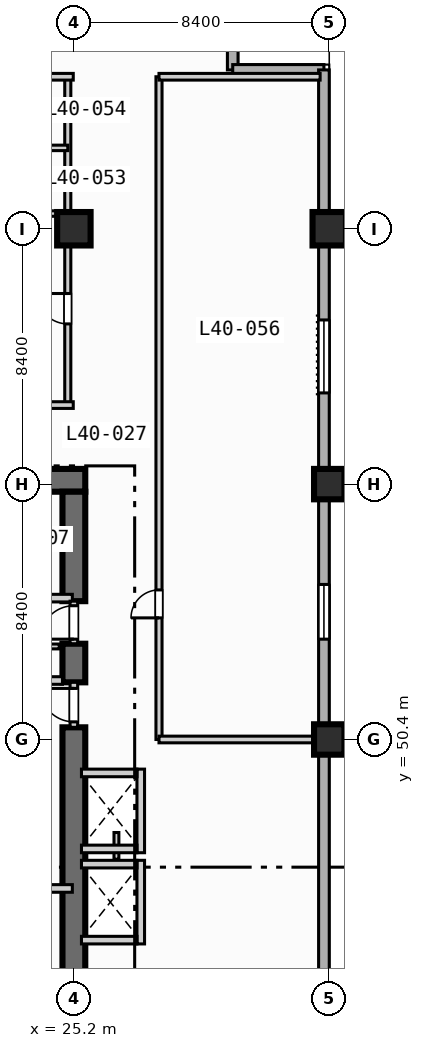
"""IFC4 building model, lengths in metres.
Left out: names, types, materials, properties, quantities, classifications, styles, units other than length and angle.
Written with IfcOpenShell. Run it as: python <this file> out.ifc"""

import sys

from ifc_helpers import new_model, si_unit, direction, frame, frame_2d, origin, origin_2d, place, context, subcontext, project, spatial, rectangle, extrude, element, fill, save


model = new_model("IFC4")
c1 = context("Model", 3, precision=1e-05, world=origin(), true_north=direction((0.0, 1.0)))
c2 = subcontext(c1, "Body", "Model", "MODEL_VIEW")
j1 = project(units=[si_unit("LENGTHUNIT", "METRE"), si_unit("PLANEANGLEUNIT", "RADIAN")], contexts=[c1])
p1 = place(None, origin())
s1 = spatial("IfcSite", under=j1, at=p1, CompositionType="ELEMENT")
p2 = place(p1, origin())
s2 = spatial("IfcBuilding", under=s1, at=p2, CompositionType="ELEMENT")
p3 = place(p2, frame((0.0, 0.0, 168.0)))
s3 = spatial("IfcBuildingStorey", under=s2, at=p3, CompositionType="ELEMENT", Elevation=168.0)
p4 = place(p3, frame((20.5, 58.925, 0.0), z_axis=(0.0, 0.0, 1.0), x_axis=(1.0, 0.0, 0.0)))
e1 = element("IfcWall", 1, at=p4, inside=s3, PredefinedType="SHEAR", context=c2, shape_type="SweptSolid", body=[
    extrude(rectangle(XDim=5.075, YDim=0.75, at=frame_2d((2.538, 0.0))), origin(), (0.0, 0.0, 1.0), 3.47),
])
p5 = place(p3, frame((25.2, 42.2, 0.0), z_axis=(0.0, 0.0, 1.0), x_axis=(0.0, 1.0, 0.0)))
e2 = element("IfcWall", 2, at=p5, inside=s3, PredefinedType="SHEAR", context=c2, shape_type="SweptSolid", body=[
    extrude(rectangle(XDim=8.6, YDim=0.75, at=frame_2d((4.3, 0.0))), origin(), (0.0, 0.0, 1.0), 3.47),
])
p6 = place(p3, frame((25.2, 52.28, 0.0), z_axis=(0.0, 0.0, 1.0), x_axis=(0.0, 1.0, 0.0)))
e3 = element("IfcWall", 3, at=p6, inside=s3, PredefinedType="SHEAR", context=c2, shape_type="SweptSolid", body=[
    extrude(rectangle(XDim=1.27, YDim=0.75, at=frame_2d((0.635, 0.0))), origin(), (0.0, 0.0, 1.0), 3.47),
])
p7 = place(p3, frame((25.2, 54.95, 0.0), z_axis=(0.0, 0.0, 1.0), x_axis=(0.0, 1.0, 0.0)))
e4 = element("IfcWall", 4, at=p7, inside=s3, PredefinedType="SHEAR", context=c2, shape_type="SweptSolid", body=[
    extrude(rectangle(XDim=3.6, YDim=0.75, at=frame_2d((1.8, 0.0))), origin(), (0.0, 0.0, 1.0), 3.47),
])
p8 = place(p3, frame((25.2, 67.2, 0.0), z_axis=(0.0, 0.0, 1.0), x_axis=(1.0, 0.0, 0.0)))
e5 = element("IfcColumn", 5, at=p8, inside=s3, PredefinedType="COLUMN", context=c2, shape_type="SweptSolid", body=[
    extrude(rectangle(XDim=1.1, YDim=1.1, at=origin_2d()), origin(), (0.0, 0.0, 1.0), 3.7),
])
for number, where, z_axis, x_axis in (
    (6, (33.6, 50.4, 0.0), (0.0, 0.0, 1.0), (1.0, 0.0, 0.0)),
    (7, (33.6, 58.8, 0.0), (0.0, 0.0, 1.0), (1.0, 0.0, 0.0)),
):
    element("IfcColumn", number, at=place(p3, frame(where, z_axis=z_axis, x_axis=x_axis)), inside=s3, PredefinedType="COLUMN", context=c2, shape_type="SweptSolid", body=[
        extrude(rectangle(XDim=1.0, YDim=1.0, at=origin_2d()), origin(), (0.0, 0.0, 1.0), 3.7),
    ])
p9 = place(p3, frame((33.6, 67.2, 0.0), z_axis=(0.0, 0.0, 1.0), x_axis=(1.0, 0.0, 0.0)))
e8 = element("IfcColumn", 8, at=p9, inside=s3, PredefinedType="COLUMN", context=c2, shape_type="SweptSolid", body=[
    extrude(rectangle(XDim=1.1, YDim=1.1, at=origin_2d()), origin(), (0.0, 0.0, 1.0), 3.7),
])
for number, where, z_axis, x_axis in (
    (9, (30.425, 75.425, 0.0), (0.0, 0.0, 1.0), (0.0, -1.0, 0.0)),
    (10, (30.425, 72.425, 0.0), (0.0, 0.0, 1.0), (1.0, 0.0, 0.0)),
):
    element("IfcWall", number, at=place(p3, frame(where, z_axis=z_axis, x_axis=x_axis)), inside=s3, PredefinedType="STANDARD", context=c2, shape_type="SweptSolid", body=[
        extrude(rectangle(XDim=3.0, YDim=0.35, at=frame_2d((1.5, 0.0))), origin(), (0.0, 0.0, 1.0), 3.47),
    ])
p10 = place(p3, frame((33.425, 72.425, 0.0), z_axis=(0.0, 0.0, 1.0), x_axis=(0.0, -1.0, 0.0)))
e11 = element("IfcWall", 11, at=p10, inside=s3, PredefinedType="STANDARD", context=c2, shape_type="SweptSolid", body=[
    extrude(rectangle(XDim=39.0, YDim=0.35, at=frame_2d((19.5, 0.0))), origin(), (0.0, 0.0, 1.0), 3.47),
])
p11 = place(p10, frame((33.725, 0.0, 0.85)))
e12 = element("IfcOpeningElement", 12, at=p11, cuts=e11, PredefinedType="OPENING", context=c2, shape_type="SweptSolid", body=[
    extrude(rectangle(XDim=1.8, YDim=1.8, at=frame_2d((0.9, 0.9))), frame((0.0, 0.185, 0.0), z_axis=(0.0, -1.0, 0.0), x_axis=(1.0, 0.0, 0.0)), (0.0, 0.0, 1.0), 0.37),
])
p12 = place(p10, frame((16.925, 0.0, 0.85)))
e13 = element("IfcOpeningElement", 13, at=p12, cuts=e11, PredefinedType="OPENING", context=c2, shape_type="SweptSolid", body=[
    extrude(rectangle(XDim=1.8, YDim=1.8, at=frame_2d((0.9, 0.9))), frame((0.0, 0.185, 0.0), z_axis=(0.0, -1.0, 0.0), x_axis=(1.0, 0.0, 0.0)), (0.0, 0.0, 1.0), 0.37),
])
p13 = place(p10, frame((8.225, 0.0, 0.85)))
e14 = element("IfcOpeningElement", 14, at=p13, cuts=e11, PredefinedType="OPENING", context=c2, shape_type="SweptSolid", body=[
    extrude(rectangle(XDim=2.4, YDim=1.95, at=frame_2d((1.2, 0.975))), frame((0.0, 0.185, 0.0), z_axis=(0.0, -1.0, 0.0), x_axis=(1.0, 0.0, 0.0)), (0.0, 0.0, 1.0), 0.37),
])
p14 = place(p3, frame((21.0, 45.5, 0.0), z_axis=(0.0, 0.0, 1.0), x_axis=(1.0, 0.0, 0.0)))
e15 = element("IfcWall", 15, at=p14, inside=s3, PredefinedType="SOLIDWALL", context=c2, shape_type="SweptSolid", body=[
    extrude(rectangle(XDim=4.15, YDim=0.25, at=frame_2d((2.075, 0.0))), origin(), (0.0, 0.0, 1.0), 3.47),
])
p15 = place(p14, frame((0.65, 0.0, 0.0)))
e16 = element("IfcOpeningElement", 16, at=p15, cuts=e15, PredefinedType="OPENING", context=c2, shape_type="SweptSolid", body=[
    extrude(rectangle(XDim=1.1, YDim=2.15, at=frame_2d((0.55, 1.075))), frame((0.0, 0.135, 0.0), z_axis=(0.0, -1.0, 0.0), x_axis=(1.0, 0.0, 0.0)), (0.0, 0.0, 1.0), 0.27),
])
p16 = place(p3, frame((25.2, 50.8, 0.0), z_axis=(0.0, 0.0, 1.0), x_axis=(0.0, 1.0, 0.0)))
e17 = element("IfcWall", 17, at=p16, inside=s3, PredefinedType="SOLIDWALL", context=c2, shape_type="SweptSolid", body=[
    extrude(rectangle(XDim=1.48, YDim=0.25, at=frame_2d((0.74, 0.0))), origin(), (0.0, 0.0, 1.0), 3.47),
])
p17 = place(p16, frame((0.18, 0.0, 0.0)))
e18 = element("IfcOpeningElement", 18, at=p17, cuts=e17, PredefinedType="OPENING", context=c2, shape_type="SweptSolid", body=[
    extrude(rectangle(XDim=1.1, YDim=2.15, at=frame_2d((0.55, 1.075))), frame((0.0, 0.135, 0.0), z_axis=(0.0, -1.0, 0.0), x_axis=(1.0, 0.0, 0.0)), (0.0, 0.0, 1.0), 0.27),
])
p18 = place(p3, frame((21.0, 52.34, 0.0), z_axis=(0.0, 0.0, 1.0), x_axis=(1.0, 0.0, 0.0)))
e19 = element("IfcWall", 19, at=p18, inside=s3, PredefinedType="SOLIDWALL", context=c2, shape_type="SweptSolid", body=[
    extrude(rectangle(XDim=3.825, YDim=0.25, at=frame_2d((1.913, 0.0))), origin(), (0.0, 0.0, 1.0), 3.47),
])
p19 = place(p3, frame((21.0, 55.05, 0.0), z_axis=(0.0, 0.0, 1.0), x_axis=(1.0, 0.0, 0.0)))
e20 = element("IfcWall", 20, at=p19, inside=s3, PredefinedType="SOLIDWALL", context=c2, shape_type="SweptSolid", body=[
    extrude(rectangle(XDim=4.15, YDim=0.25, at=frame_2d((2.075, 0.0))), origin(), (0.0, 0.0, 1.0), 3.47),
])
p20 = place(p19, frame((1.85, 0.0, 0.0)))
e21 = element("IfcOpeningElement", 21, at=p20, cuts=e20, PredefinedType="OPENING", context=c2, shape_type="SweptSolid", body=[
    extrude(rectangle(XDim=1.1, YDim=2.15, at=frame_2d((0.55, 1.075))), frame((0.0, 0.135, 0.0), z_axis=(0.0, -1.0, 0.0), x_axis=(1.0, 0.0, 0.0)), (0.0, 0.0, 1.0), 0.27),
])
p21 = place(p3, frame((25.2, 53.55, 0.0), z_axis=(0.0, 0.0, 1.0), x_axis=(0.0, 1.0, 0.0)))
e22 = element("IfcWall", 22, at=p21, inside=s3, PredefinedType="SOLIDWALL", context=c2, shape_type="SweptSolid", body=[
    extrude(rectangle(XDim=1.4, YDim=0.25, at=frame_2d((0.7, 0.0))), origin(), (0.0, 0.0, 1.0), 3.47),
])
p22 = place(p21, frame((0.15, 0.0, 0.0)))
e23 = element("IfcOpeningElement", 23, at=p22, cuts=e22, PredefinedType="OPENING", context=c2, shape_type="SweptSolid", body=[
    extrude(rectangle(XDim=1.1, YDim=2.15, at=frame_2d((0.55, 1.075))), frame((0.0, 0.135, 0.0), z_axis=(0.0, -1.0, 0.0), x_axis=(1.0, 0.0, 0.0)), (0.0, 0.0, 1.0), 0.27),
])
p23 = place(p3, frame((22.32, 53.46, 0.0), z_axis=(0.0, 0.0, 1.0), x_axis=(1.0, 0.0, 0.0)))
e24 = element("IfcWall", 24, at=p23, inside=s3, PredefinedType="PARTITIONING", context=c2, shape_type="SweptSolid", body=[
    extrude(rectangle(XDim=2.4, YDim=0.16, at=frame_2d((1.2, 0.0))), origin(), (0.0, 0.0, 1.0), 3.47),
])
p24 = place(p23, frame((0.65, 0.0, 0.0)))
e25 = element("IfcOpeningElement", 25, at=p24, cuts=e24, PredefinedType="OPENING", context=c2, shape_type="SweptSolid", body=[
    extrude(rectangle(XDim=0.9, YDim=2.1, at=frame_2d((0.45, 1.05))), frame((0.0, 0.09, 0.0), z_axis=(0.0, -1.0, 0.0), x_axis=(1.0, 0.0, 0.0)), (0.0, 0.0, 1.0), 0.18),
])
p25 = place(p3, frame((27.4, 43.675, 0.0), z_axis=(0.0, 0.0, 1.0), x_axis=(0.0, 1.0, 0.0)))
e26 = element("IfcWall", 26, at=p25, inside=s3, PredefinedType="SOLIDWALL", context=c2, shape_type="SweptSolid", body=[
    extrude(rectangle(XDim=2.75, YDim=0.25, at=frame_2d((1.375, 0.0))), origin(), (0.0, 0.0, 1.0), 3.47),
])
for number, where, z_axis, x_axis in (
    (27, (25.45, 43.8, 0.0), (0.0, 0.0, 1.0), (1.0, 0.0, 0.0)),
    (28, (25.45, 46.3, 0.0), (0.0, 0.0, 1.0), (1.0, 0.0, 0.0)),
):
    element("IfcWall", number, at=place(p3, frame(where, z_axis=z_axis, x_axis=x_axis)), inside=s3, PredefinedType="SOLIDWALL", context=c2, shape_type="SweptSolid", body=[
        extrude(rectangle(XDim=1.825, YDim=0.25, at=frame_2d((0.913, 0.0))), origin(), (0.0, 0.0, 1.0), 3.47),
    ])
p26 = place(p3, frame((26.6, 46.46, 0.0), z_axis=(0.0, 0.0, 1.0), x_axis=(0.0, 1.0, 0.0)))
e29 = element("IfcWall", 29, at=p26, inside=s3, PredefinedType="PARTITIONING", context=c2, shape_type="SweptSolid", body=[
    extrude(rectangle(XDim=0.88, YDim=0.16, at=frame_2d((0.44, 0.0))), origin(), (0.0, 0.0, 1.0), 3.47),
])
p27 = place(p3, frame((27.4, 46.675, 0.0), z_axis=(0.0, 0.0, 1.0), x_axis=(0.0, 1.0, 0.0)))
e30 = element("IfcWall", 30, at=p27, inside=s3, PredefinedType="SOLIDWALL", context=c2, shape_type="SweptSolid", body=[
    extrude(rectangle(XDim=2.75, YDim=0.25, at=frame_2d((1.375, 0.0))), origin(), (0.0, 0.0, 1.0), 3.47),
])
for number, where, z_axis, x_axis in (
    (31, (25.45, 46.8, 0.0), (0.0, 0.0, 1.0), (1.0, 0.0, 0.0)),
    (32, (25.45, 49.3, 0.0), (0.0, 0.0, 1.0), (1.0, 0.0, 0.0)),
):
    element("IfcWall", number, at=place(p3, frame(where, z_axis=z_axis, x_axis=x_axis)), inside=s3, PredefinedType="SOLIDWALL", context=c2, shape_type="SweptSolid", body=[
        extrude(rectangle(XDim=1.825, YDim=0.25, at=frame_2d((0.913, 0.0))), origin(), (0.0, 0.0, 1.0), 3.47),
    ])
p28 = place(p3, frame((25.0, 61.4, 0.0), z_axis=(0.0, 0.0, 1.0), x_axis=(0.0, 1.0, 0.0)))
e33 = element("IfcWall", 33, at=p28, inside=s3, PredefinedType="PARTITIONING", context=c2, shape_type="SweptSolid", body=[
    extrude(rectangle(XDim=10.8, YDim=0.2, at=frame_2d((5.4, 0.0))), origin(), (0.0, 0.0, 1.0), 2.82),
])
p29 = place(p28, frame((2.67, 0.0, 0.0)))
e34 = element("IfcOpeningElement", 34, at=p29, cuts=e33, PredefinedType="OPENING", context=c2, shape_type="SweptSolid", body=[
    extrude(rectangle(XDim=1.0, YDim=2.15, at=frame_2d((0.5, 1.075))), frame((0.0, 0.11, 0.0), z_axis=(0.0, -1.0, 0.0), x_axis=(1.0, 0.0, 0.0)), (0.0, 0.0, 1.0), 0.22),
])
for number, where, z_axis, x_axis in (
    (35, (0.2, 61.4, 0.0), (0.0, 0.0, 1.0), (1.0, 0.0, 0.0)),
    (36, (0.2, 72.2, 0.0), (0.0, 0.0, 1.0), (1.0, 0.0, 0.0)),
):
    element("IfcWall", number, at=place(p3, frame(where, z_axis=z_axis, x_axis=x_axis)), inside=s3, PredefinedType="PARTITIONING", context=c2, shape_type="SweptSolid", body=[
        extrude(rectangle(XDim=24.98, YDim=0.22, at=frame_2d((12.49, 0.0))), origin(), (0.0, 0.0, 1.0), 3.47),
    ])
for number, where, z_axis, x_axis in (
    (37, (22.55, 67.7, 0.0), (0.0, 0.0, 1.0), (1.0, 0.0, 0.0)),
    (38, (22.55, 69.86, 0.0), (0.0, 0.0, 1.0), (1.0, 0.0, 0.0)),
):
    element("IfcWall", number, at=place(p3, frame(where, z_axis=z_axis, x_axis=x_axis)), inside=s3, PredefinedType="PLUMBINGWALL", context=c2, shape_type="SweptSolid", body=[
        extrude(rectangle(XDim=2.45, YDim=0.18, at=frame_2d((1.225, 0.0))), origin(), (0.0, 0.0, 1.0), 3.47),
    ])
p30 = place(p3, frame((28.0, 50.4, 0.0), z_axis=(0.0, 0.0, 1.0), x_axis=(0.0, 1.0, 0.0)))
e39 = element("IfcWall", 39, at=p30, inside=s3, PredefinedType="PARTITIONING", context=c2, shape_type="SweptSolid", body=[
    extrude(rectangle(XDim=21.8, YDim=0.2, at=frame_2d((10.9, 0.0))), origin(), (0.0, 0.0, 1.0), 3.47),
])
p31 = place(p30, frame((4.0, 0.0, 0.0)))
e40 = element("IfcOpeningElement", 40, at=p31, cuts=e39, PredefinedType="OPENING", context=c2, shape_type="SweptSolid", body=[
    extrude(rectangle(XDim=0.92, YDim=2.1, at=frame_2d((0.46, 1.05))), frame((0.0, 0.11, 0.0), z_axis=(0.0, -1.0, 0.0), x_axis=(1.0, 0.0, 0.0)), (0.0, 0.0, 1.0), 0.22),
])
p32 = place(p3, frame((28.0, 50.4, 0.0), z_axis=(0.0, 0.0, 1.0), x_axis=(1.0, 0.0, 0.0)))
e41 = element("IfcWall", 41, at=p32, inside=s3, PredefinedType="PARTITIONING", context=c2, shape_type="SweptSolid", body=[
    extrude(rectangle(XDim=5.3, YDim=0.22, at=frame_2d((2.65, 0.0))), origin(), (0.0, 0.0, 1.0), 2.931),
])
p33 = place(p3, frame((28.0, 72.2, 0.0), z_axis=(0.0, 0.0, 1.0), x_axis=(1.0, 0.0, 0.0)))
e42 = element("IfcWall", 42, at=p33, inside=s3, PredefinedType="PARTITIONING", context=c2, shape_type="SweptSolid", body=[
    extrude(rectangle(XDim=5.3, YDim=0.22, at=frame_2d((2.65, 0.0))), origin(), (0.0, 0.0, 1.0), 3.47),
])
p34 = place(p12, origin())
e43 = element("IfcWindow", 43, at=p34, inside=s3, PartitioningType="SINGLE_PANEL", PredefinedType="WINDOW", context=c2, shape_type="SweptSolid", body=[
    extrude(rectangle(XDim=1.8, YDim=1.8, at=frame_2d((0.9, 0.9))), frame((0.0, 0.03, 0.0), z_axis=(0.0, -1.0, 0.0), x_axis=(1.0, 0.0, 0.0)), (0.0, 0.0, 1.0), 0.06),
])
fill(e13, e43)
p35 = place(p13, origin())
e44 = element("IfcWindow", 44, at=p35, inside=s3, PartitioningType="SINGLE_PANEL", PredefinedType="WINDOW", context=c2, shape_type="SweptSolid", body=[
    extrude(rectangle(XDim=2.4, YDim=1.95, at=frame_2d((1.2, 0.975))), frame((0.0, 0.03, 0.0), z_axis=(0.0, -1.0, 0.0), x_axis=(1.0, 0.0, 0.0)), (0.0, 0.0, 1.0), 0.06),
])
fill(e14, e44)
p36 = place(p17, origin())
e45 = element("IfcDoor", 45, at=p36, inside=s3, OperationType="SINGLE_SWING_RIGHT", PredefinedType="DOOR", context=c2, shape_type="SweptSolid", body=[
    extrude(rectangle(XDim=1.1, YDim=2.15, at=frame_2d((0.55, 1.075))), frame((0.0, 0.025, 0.0), z_axis=(0.0, -1.0, 0.0), x_axis=(1.0, 0.0, 0.0)), (0.0, 0.0, 1.0), 0.05),
])
fill(e18, e45)
p37 = place(p22, origin())
e46 = element("IfcDoor", 46, at=p37, inside=s3, OperationType="SINGLE_SWING_LEFT", PredefinedType="DOOR", context=c2, shape_type="SweptSolid", body=[
    extrude(rectangle(XDim=1.1, YDim=2.15, at=frame_2d((0.55, 1.075))), frame((0.0, 0.025, 0.0), z_axis=(0.0, -1.0, 0.0), x_axis=(1.0, 0.0, 0.0)), (0.0, 0.0, 1.0), 0.05),
])
fill(e23, e46)
p38 = place(p29, origin())
e47 = element("IfcDoor", 47, at=p38, inside=s3, OperationType="SINGLE_SWING_RIGHT", PredefinedType="DOOR", context=c2, shape_type="SweptSolid", body=[
    extrude(rectangle(XDim=1.0, YDim=2.15, at=frame_2d((0.5, 1.075))), frame((0.0, 0.025, 0.0), z_axis=(0.0, -1.0, 0.0), x_axis=(1.0, 0.0, 0.0)), (0.0, 0.0, 1.0), 0.05),
])
fill(e34, e47)
p39 = place(p31, origin())
e48 = element("IfcDoor", 48, at=p39, inside=s3, OperationType="SINGLE_SWING_LEFT", PredefinedType="DOOR", context=c2, shape_type="SweptSolid", body=[
    extrude(rectangle(XDim=0.92, YDim=2.1, at=frame_2d((0.46, 1.05))), frame((0.0, 0.025, 0.0), z_axis=(0.0, -1.0, 0.0), x_axis=(1.0, 0.0, 0.0)), (0.0, 0.0, 1.0), 0.05),
])
fill(e40, e48)
save(model, sys.argv[1])
